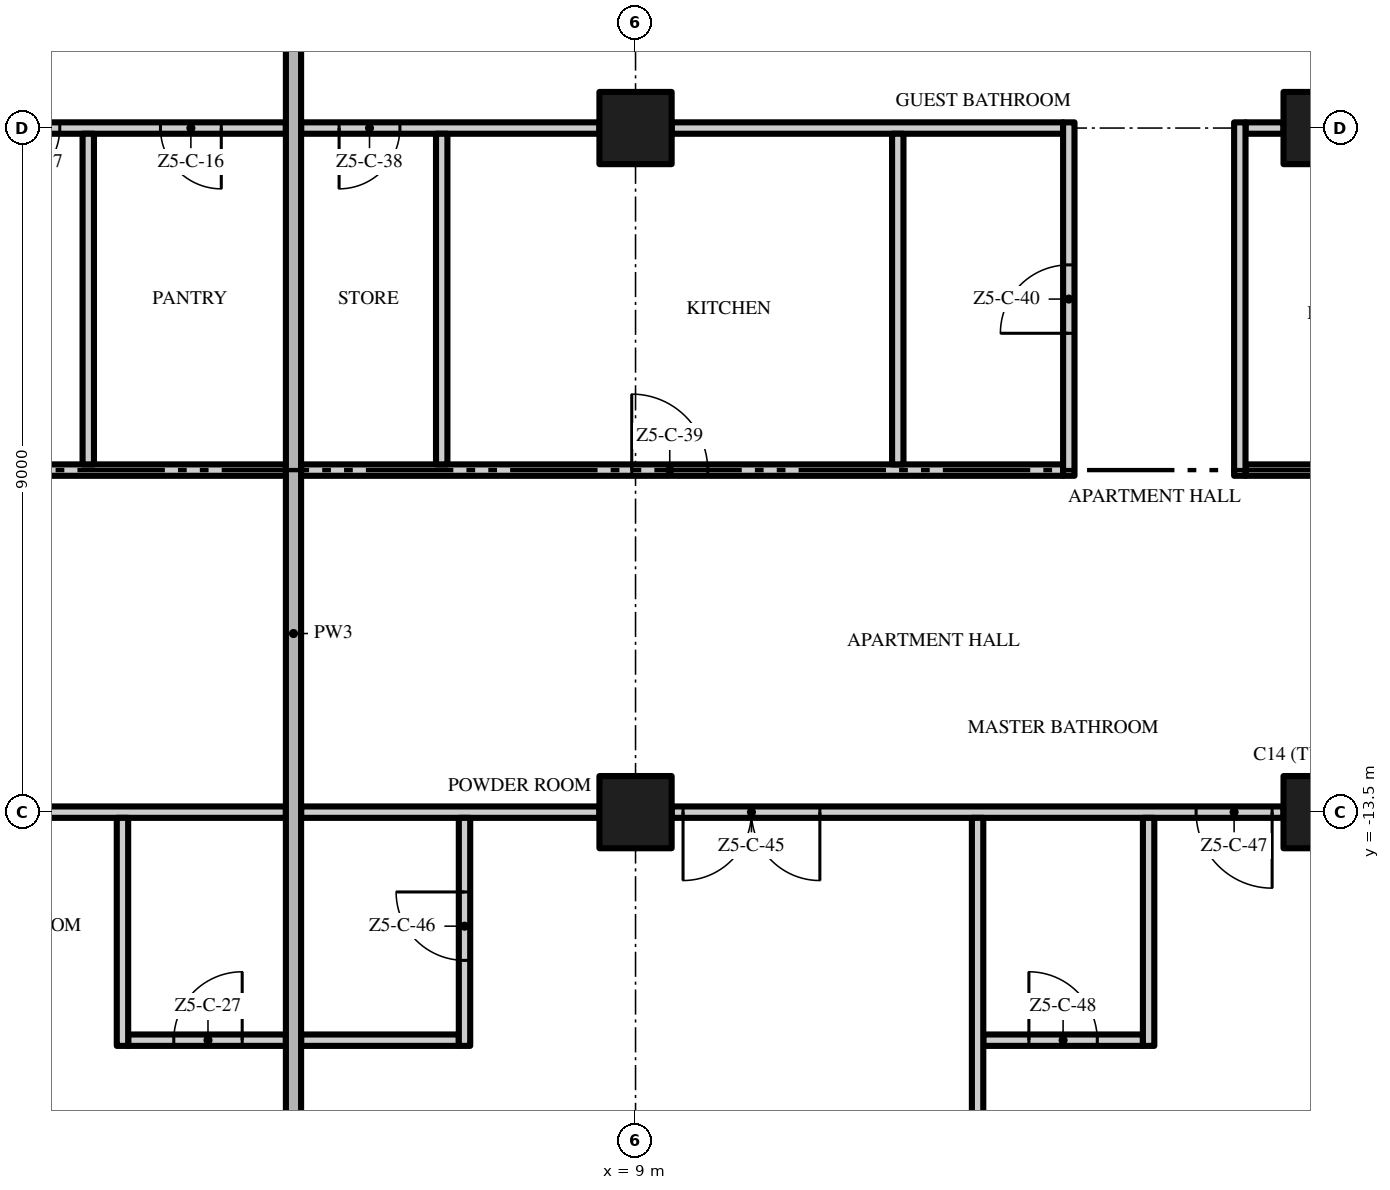
"""IFC4 building model, lengths in metres.
Left out: names, types, materials, properties, quantities, classifications, styles, units other than length and angle.
Written with IfcOpenShell. Run it as: python <this file> out.ifc"""

import sys

from ifc_helpers import new_model, si_unit, direction, frame, frame_2d, origin, origin_2d, place, context, subcontext, project, spatial, rectangle, extrude, element, fill, save


model = new_model("IFC4")
c1 = context("Model", 3, precision=1e-05, world=origin(), true_north=direction((0.0, 1.0)))
c2 = subcontext(c1, "Body", "Model", "MODEL_VIEW")
j1 = project(units=[si_unit("LENGTHUNIT", "METRE"), si_unit("PLANEANGLEUNIT", "RADIAN")], contexts=[c1])
p1 = place(None, origin())
s1 = spatial("IfcSite", under=j1, at=p1, CompositionType="ELEMENT")
p2 = place(p1, origin())
s2 = spatial("IfcBuilding", under=s1, at=p2, CompositionType="ELEMENT")
p3 = place(p2, frame((0.0, 0.0, 269.2)))
s3 = spatial("IfcBuildingStorey", under=s2, at=p3, CompositionType="ELEMENT", Elevation=269.2)
for number, where, z_axis, x_axis in (
    (1, (18.0, -13.5, 0.0), (0.0, 0.0, 1.0), (1.0, 0.0, 0.0)),
    (2, (18.0, -4.5, 0.0), (0.0, 0.0, 1.0), (1.0, 0.0, 0.0)),
    (3, (9.0, -13.5, 0.0), (0.0, 0.0, 1.0), (1.0, 0.0, 0.0)),
    (4, (9.0, -4.5, 0.0), (0.0, 0.0, 1.0), (1.0, 0.0, 0.0)),
):
    element("IfcColumn", number, at=place(p3, frame(where, z_axis=z_axis, x_axis=x_axis)), inside=s3, PredefinedType="COLUMN", context=c2, shape_type="SweptSolid", body=[
        extrude(rectangle(XDim=0.95, YDim=0.95, at=origin_2d()), origin(), (0.0, 0.0, 1.0), 3.5),
    ])
p4 = place(p3, frame((2.325, -16.5, 0.0), z_axis=(0.0, 0.0, 1.0), x_axis=(1.0, 0.0, 0.0)))
e5 = element("IfcWall", 5, at=p4, inside=s3, PredefinedType="PARTITIONING", context=c2, shape_type="SweptSolid", body=[
    extrude(rectangle(XDim=2.075, YDim=0.15, at=frame_2d((1.038, 0.0))), origin(), (0.0, 0.0, 1.0), 3.5),
])
p5 = place(p4, frame((0.6, 0.0, 0.0)))
e6 = element("IfcOpeningElement", 6, at=p5, cuts=e5, PredefinedType="OPENING", context=c2, shape_type="SweptSolid", body=[
    extrude(rectangle(XDim=0.9, YDim=2.1, at=frame_2d((0.45, 1.05))), frame((0.0, 0.085, 0.0), z_axis=(0.0, -1.0, 0.0), x_axis=(1.0, 0.0, 0.0)), (0.0, 0.0, 1.0), 0.17),
])
p6 = place(p3, frame((4.6, -16.5, 0.0), z_axis=(0.0, 0.0, 1.0), x_axis=(1.0, 0.0, 0.0)))
e7 = element("IfcWall", 7, at=p6, inside=s3, PredefinedType="PARTITIONING", context=c2, shape_type="SweptSolid", body=[
    extrude(rectangle(XDim=2.075, YDim=0.15, at=frame_2d((1.038, 0.0))), origin(), (0.0, 0.0, 1.0), 3.5),
])
p7 = place(p3, frame((13.575, -16.5, 0.0), z_axis=(0.0, 0.0, 1.0), x_axis=(1.0, 0.0, 0.0)))
e8 = element("IfcWall", 8, at=p7, inside=s3, PredefinedType="PARTITIONING", context=c2, shape_type="SweptSolid", body=[
    extrude(rectangle(XDim=2.1, YDim=0.15, at=frame_2d((1.05, 0.0))), origin(), (0.0, 0.0, 1.0), 3.5),
])
p8 = place(p7, frame((0.6, 0.0, 0.0)))
e9 = element("IfcOpeningElement", 9, at=p8, cuts=e8, PredefinedType="OPENING", context=c2, shape_type="SweptSolid", body=[
    extrude(rectangle(XDim=0.9, YDim=2.1, at=frame_2d((0.45, 1.05))), frame((0.0, 0.085, 0.0), z_axis=(0.0, -1.0, 0.0), x_axis=(1.0, 0.0, 0.0)), (0.0, 0.0, 1.0), 0.17),
])
for number, where, z_axis, x_axis in (
    (10, (0.475, -13.5, 0.0), (0.0, 0.0, 1.0), (1.0, 0.0, 0.0)),
    (11, (4.6, -13.5, 0.0), (0.0, 0.0, 1.0), (1.0, 0.0, 0.0)),
):
    element("IfcWall", number, at=place(p3, frame(where, z_axis=z_axis, x_axis=x_axis)), inside=s3, PredefinedType="PARTITIONING", context=c2, shape_type="SweptSolid", body=[
        extrude(rectangle(XDim=3.925, YDim=0.15, at=frame_2d((1.962, 0.0))), origin(), (0.0, 0.0, 1.0), 3.5),
    ])
p9 = place(p3, frame((17.525, -13.5, 0.0), z_axis=(0.0, 0.0, 1.0), x_axis=(-1.0, 0.0, 0.0)))
e12 = element("IfcWall", 12, at=p9, inside=s3, PredefinedType="PARTITIONING", context=c2, shape_type="SweptSolid", body=[
    extrude(rectangle(XDim=8.05, YDim=0.15, at=frame_2d((4.025, 0.0))), origin(), (0.0, 0.0, 1.0), 3.5),
])
p10 = place(p9, frame((6.1, 0.0, 0.0)))
e13 = element("IfcOpeningElement", 13, at=p10, cuts=e12, PredefinedType="OPENING", context=c2, shape_type="SweptSolid", body=[
    extrude(rectangle(XDim=1.8, YDim=2.4, at=frame_2d((0.9, 1.2))), frame((0.0, 0.085, 0.0), z_axis=(0.0, -1.0, 0.0), x_axis=(1.0, 0.0, 0.0)), (0.0, 0.0, 1.0), 0.17),
])
p11 = place(p9, frame((0.15, 0.0, 0.0)))
e14 = element("IfcOpeningElement", 14, at=p11, cuts=e12, PredefinedType="OPENING", context=c2, shape_type="SweptSolid", body=[
    extrude(rectangle(XDim=1.0, YDim=2.4, at=frame_2d((0.5, 1.2))), frame((0.0, 0.085, 0.0), z_axis=(0.0, -1.0, 0.0), x_axis=(1.0, 0.0, 0.0)), (0.0, 0.0, 1.0), 0.17),
])
p12 = place(p3, frame((-11.625, -9.0, 0.0), z_axis=(0.0, 0.0, 1.0), x_axis=(1.0, 0.0, 0.0)))
e15 = element("IfcWall", 15, at=p12, inside=s3, PredefinedType="PARTITIONING", context=c2, shape_type="SweptSolid", body=[
    extrude(rectangle(XDim=16.025, YDim=0.15, at=frame_2d((8.012, 0.0))), origin(), (0.0, 0.0, 1.0), 3.5),
])
p13 = place(p12, frame((4.675, 0.0, 0.0)))
e16 = element("IfcOpeningElement", 16, at=p13, cuts=e15, PredefinedType="OPENING", context=c2, shape_type="SweptSolid", body=[
    extrude(rectangle(XDim=1.0, YDim=2.4, at=frame_2d((0.5, 1.2))), frame((0.0, 0.085, 0.0), z_axis=(0.0, -1.0, 0.0), x_axis=(1.0, 0.0, 0.0)), (0.0, 0.0, 1.0), 0.17),
])
p14 = place(p3, frame((4.6, -9.0, 0.0), z_axis=(0.0, 0.0, 1.0), x_axis=(1.0, 0.0, 0.0)))
e17 = element("IfcWall", 17, at=p14, inside=s3, PredefinedType="PARTITIONING", context=c2, shape_type="SweptSolid", body=[
    extrude(rectangle(XDim=10.025, YDim=0.15, at=frame_2d((5.013, 0.0))), origin(), (0.0, 0.0, 1.0), 3.5),
])
p15 = place(p14, frame((4.35, 0.0, 0.0)))
e18 = element("IfcOpeningElement", 18, at=p15, cuts=e17, PredefinedType="OPENING", context=c2, shape_type="SweptSolid", body=[
    extrude(rectangle(XDim=1.0, YDim=2.4, at=frame_2d((0.5, 1.2))), frame((0.0, 0.085, 0.0), z_axis=(0.0, -1.0, 0.0), x_axis=(1.0, 0.0, 0.0)), (0.0, 0.0, 1.0), 0.17),
])
p16 = place(p3, frame((17.025, -9.0, 0.0), z_axis=(0.0, 0.0, 1.0), x_axis=(1.0, 0.0, 0.0)))
e19 = element("IfcWall", 19, at=p16, inside=s3, PredefinedType="PARTITIONING", context=c2, shape_type="SweptSolid", body=[
    extrude(rectangle(XDim=9.675, YDim=0.15, at=frame_2d((4.838, 0.0))), origin(), (0.0, 0.0, 1.0), 3.5),
])
p17 = place(p3, frame((4.4, -4.5, 0.0), z_axis=(0.0, 0.0, 1.0), x_axis=(-1.0, 0.0, 0.0)))
e20 = element("IfcWall", 20, at=p17, inside=s3, PredefinedType="PARTITIONING", context=c2, shape_type="SweptSolid", body=[
    extrude(rectangle(XDim=3.925, YDim=0.15, at=frame_2d((1.962, 0.0))), origin(), (0.0, 0.0, 1.0), 3.5),
])
p18 = place(p17, frame((0.85, 0.0, 0.0)))
e21 = element("IfcOpeningElement", 21, at=p18, cuts=e20, PredefinedType="OPENING", context=c2, shape_type="SweptSolid", body=[
    extrude(rectangle(XDim=0.8, YDim=2.0, at=frame_2d((0.4, 1.0))), frame((0.0, 0.085, 0.0), z_axis=(0.0, -1.0, 0.0), x_axis=(1.0, 0.0, 0.0)), (0.0, 0.0, 1.0), 0.17),
])
p19 = place(p17, frame((2.975, 0.0, 0.0)))
e22 = element("IfcOpeningElement", 22, at=p19, cuts=e20, PredefinedType="OPENING", context=c2, shape_type="SweptSolid", body=[
    extrude(rectangle(XDim=0.8, YDim=2.0, at=frame_2d((0.4, 1.0))), frame((0.0, 0.085, 0.0), z_axis=(0.0, -1.0, 0.0), x_axis=(1.0, 0.0, 0.0)), (0.0, 0.0, 1.0), 0.17),
])
p20 = place(p3, frame((8.525, -4.5, 0.0), z_axis=(0.0, 0.0, 1.0), x_axis=(-1.0, 0.0, 0.0)))
e23 = element("IfcWall", 23, at=p20, inside=s3, PredefinedType="PARTITIONING", context=c2, shape_type="SweptSolid", body=[
    extrude(rectangle(XDim=3.925, YDim=0.15, at=frame_2d((1.962, 0.0))), origin(), (0.0, 0.0, 1.0), 3.5),
])
p21 = place(p20, frame((2.625, 0.0, 0.0)))
e24 = element("IfcOpeningElement", 24, at=p21, cuts=e23, PredefinedType="OPENING", context=c2, shape_type="SweptSolid", body=[
    extrude(rectangle(XDim=0.8, YDim=2.0, at=frame_2d((0.4, 1.0))), frame((0.0, 0.085, 0.0), z_axis=(0.0, -1.0, 0.0), x_axis=(1.0, 0.0, 0.0)), (0.0, 0.0, 1.0), 0.17),
])
p22 = place(p3, frame((9.475, -4.5, 0.0), z_axis=(0.0, 0.0, 1.0), x_axis=(1.0, 0.0, 0.0)))
e25 = element("IfcWall", 25, at=p22, inside=s3, PredefinedType="PARTITIONING", context=c2, shape_type="SweptSolid", body=[
    extrude(rectangle(XDim=5.15, YDim=0.15, at=frame_2d((2.575, 0.0))), origin(), (0.0, 0.0, 1.0), 3.5),
])
p23 = place(p3, frame((17.025, -4.5, 0.0), z_axis=(0.0, 0.0, 1.0), x_axis=(1.0, 0.0, 0.0)))
e26 = element("IfcWall", 26, at=p23, inside=s3, PredefinedType="PARTITIONING", context=c2, shape_type="SweptSolid", body=[
    extrude(rectangle(XDim=0.5, YDim=0.15, at=frame_2d((0.25, 0.0))), origin(), (0.0, 0.0, 1.0), 3.5),
])
p24 = place(p3, frame((1.8, -8.925, 0.0), z_axis=(0.0, 0.0, 1.0), x_axis=(0.0, 1.0, 0.0)))
e27 = element("IfcWall", 27, at=p24, inside=s3, PredefinedType="PARTITIONING", context=c2, shape_type="SweptSolid", body=[
    extrude(rectangle(XDim=4.35, YDim=0.15, at=frame_2d((2.175, 0.0))), origin(), (0.0, 0.0, 1.0), 3.5),
])
p25 = place(p3, frame((2.25, -16.575, 0.0), z_axis=(0.0, 0.0, 1.0), x_axis=(0.0, 1.0, 0.0)))
e28 = element("IfcWall", 28, at=p25, inside=s3, PredefinedType="PARTITIONING", context=c2, shape_type="SweptSolid", body=[
    extrude(rectangle(XDim=3.0, YDim=0.15, at=frame_2d((1.5, 0.0))), origin(), (0.0, 0.0, 1.0), 3.5),
])
p26 = place(p3, frame((4.5, -22.2, 0.0), z_axis=(0.0, 0.0, 1.0), x_axis=(0.0, 1.0, 0.0)))
e29 = element("IfcWall", 29, at=p26, inside=s3, PredefinedType="PARTITIONING", context=c2, shape_type="SweptSolid", body=[
    extrude(rectangle(XDim=22.1, YDim=0.2, at=frame_2d((11.05, 0.0))), origin(), (0.0, 0.0, 1.0), 3.5),
])
p27 = place(p3, frame((6.45, -8.925, 0.0), z_axis=(0.0, 0.0, 1.0), x_axis=(0.0, 1.0, 0.0)))
e30 = element("IfcWall", 30, at=p27, inside=s3, PredefinedType="PARTITIONING", context=c2, shape_type="SweptSolid", body=[
    extrude(rectangle(XDim=4.35, YDim=0.15, at=frame_2d((2.175, 0.0))), origin(), (0.0, 0.0, 1.0), 3.5),
])
p28 = place(p3, frame((6.75, -16.575, 0.0), z_axis=(0.0, 0.0, 1.0), x_axis=(0.0, 1.0, 0.0)))
e31 = element("IfcWall", 31, at=p28, inside=s3, PredefinedType="PARTITIONING", context=c2, shape_type="SweptSolid", body=[
    extrude(rectangle(XDim=3.0, YDim=0.15, at=frame_2d((1.5, 0.0))), origin(), (0.0, 0.0, 1.0), 3.5),
])
p29 = place(p28, frame((1.125, 0.0, 0.0)))
e32 = element("IfcOpeningElement", 32, at=p29, cuts=e31, PredefinedType="OPENING", context=c2, shape_type="SweptSolid", body=[
    extrude(rectangle(XDim=0.9, YDim=2.1, at=frame_2d((0.45, 1.05))), frame((0.0, 0.085, 0.0), z_axis=(0.0, -1.0, 0.0), x_axis=(1.0, 0.0, 0.0)), (0.0, 0.0, 1.0), 0.17),
])
p30 = place(p3, frame((12.45, -8.925, 0.0), z_axis=(0.0, 0.0, 1.0), x_axis=(0.0, 1.0, 0.0)))
e33 = element("IfcWall", 33, at=p30, inside=s3, PredefinedType="PARTITIONING", context=c2, shape_type="SweptSolid", body=[
    extrude(rectangle(XDim=4.35, YDim=0.15, at=frame_2d((2.175, 0.0))), origin(), (0.0, 0.0, 1.0), 3.5),
])
p31 = place(p3, frame((13.5, -22.2, 0.0), z_axis=(0.0, 0.0, 1.0), x_axis=(0.0, 1.0, 0.0)))
e34 = element("IfcWall", 34, at=p31, inside=s3, PredefinedType="PARTITIONING", context=c2, shape_type="SweptSolid", body=[
    extrude(rectangle(XDim=8.625, YDim=0.15, at=frame_2d((4.312, 0.0))), origin(), (0.0, 0.0, 1.0), 3.5),
])
p32 = place(p3, frame((14.7, -9.075, 0.0), z_axis=(0.0, 0.0, 1.0), x_axis=(0.0, 1.0, 0.0)))
e35 = element("IfcWall", 35, at=p32, inside=s3, PredefinedType="PARTITIONING", context=c2, shape_type="SweptSolid", body=[
    extrude(rectangle(XDim=4.65, YDim=0.15, at=frame_2d((2.325, 0.0))), origin(), (0.0, 0.0, 1.0), 3.5),
])
p33 = place(p32, frame((1.875, 0.0, 0.0)))
e36 = element("IfcOpeningElement", 36, at=p33, cuts=e35, PredefinedType="OPENING", context=c2, shape_type="SweptSolid", body=[
    extrude(rectangle(XDim=0.9, YDim=2.1, at=frame_2d((0.45, 1.05))), frame((0.0, 0.085, 0.0), z_axis=(0.0, -1.0, 0.0), x_axis=(1.0, 0.0, 0.0)), (0.0, 0.0, 1.0), 0.17),
])
p34 = place(p3, frame((15.75, -16.575, 0.0), z_axis=(0.0, 0.0, 1.0), x_axis=(0.0, 1.0, 0.0)))
e37 = element("IfcWall", 37, at=p34, inside=s3, PredefinedType="PARTITIONING", context=c2, shape_type="SweptSolid", body=[
    extrude(rectangle(XDim=3.0, YDim=0.15, at=frame_2d((1.5, 0.0))), origin(), (0.0, 0.0, 1.0), 3.5),
])
p35 = place(p3, frame((16.95, -9.075, 0.0), z_axis=(0.0, 0.0, 1.0), x_axis=(0.0, 1.0, 0.0)))
e38 = element("IfcWall", 38, at=p35, inside=s3, PredefinedType="PARTITIONING", context=c2, shape_type="SweptSolid", body=[
    extrude(rectangle(XDim=4.65, YDim=0.15, at=frame_2d((2.325, 0.0))), origin(), (0.0, 0.0, 1.0), 3.5),
])
p36 = place(p18, origin())
e39 = element("IfcDoor", 39, at=p36, inside=s3, OperationType="SINGLE_SWING_LEFT", PredefinedType="DOOR", context=c2, shape_type="SweptSolid", body=[
    extrude(rectangle(XDim=0.8, YDim=2.0, at=frame_2d((0.4, 1.0))), frame((0.0, 0.025, 0.0), z_axis=(0.0, -1.0, 0.0), x_axis=(1.0, 0.0, 0.0)), (0.0, 0.0, 1.0), 0.05),
])
fill(e21, e39)
p37 = place(p19, origin())
e40 = element("IfcDoor", 40, at=p37, inside=s3, OperationType="SINGLE_SWING_RIGHT", PredefinedType="DOOR", context=c2, shape_type="SweptSolid", body=[
    extrude(rectangle(XDim=0.8, YDim=2.0, at=frame_2d((0.4, 1.0))), frame((0.0, 0.025, 0.0), z_axis=(0.0, -1.0, 0.0), x_axis=(1.0, 0.0, 0.0)), (0.0, 0.0, 1.0), 0.05),
])
fill(e22, e40)
p38 = place(p5, origin())
e41 = element("IfcDoor", 41, at=p38, inside=s3, OperationType="SINGLE_SWING_RIGHT", PredefinedType="DOOR", context=c2, shape_type="SweptSolid", body=[
    extrude(rectangle(XDim=0.9, YDim=2.1, at=frame_2d((0.45, 1.05))), frame((0.0, 0.025, 0.0), z_axis=(0.0, -1.0, 0.0), x_axis=(1.0, 0.0, 0.0)), (0.0, 0.0, 1.0), 0.05),
])
fill(e6, e41)
p39 = place(p21, origin())
e42 = element("IfcDoor", 42, at=p39, inside=s3, OperationType="SINGLE_SWING_RIGHT", PredefinedType="DOOR", context=c2, shape_type="SweptSolid", body=[
    extrude(rectangle(XDim=0.8, YDim=2.0, at=frame_2d((0.4, 1.0))), frame((0.0, 0.025, 0.0), z_axis=(0.0, -1.0, 0.0), x_axis=(1.0, 0.0, 0.0)), (0.0, 0.0, 1.0), 0.05),
])
fill(e24, e42)
p40 = place(p15, origin())
e43 = element("IfcDoor", 43, at=p40, inside=s3, OperationType="SINGLE_SWING_LEFT", PredefinedType="DOOR", context=c2, shape_type="SweptSolid", body=[
    extrude(rectangle(XDim=1.0, YDim=2.4, at=frame_2d((0.5, 1.2))), frame((0.0, 0.025, 0.0), z_axis=(0.0, -1.0, 0.0), x_axis=(1.0, 0.0, 0.0)), (0.0, 0.0, 1.0), 0.05),
])
fill(e18, e43)
p41 = place(p33, origin())
e44 = element("IfcDoor", 44, at=p41, inside=s3, OperationType="SINGLE_SWING_LEFT", PredefinedType="DOOR", context=c2, shape_type="SweptSolid", body=[
    extrude(rectangle(XDim=0.9, YDim=2.1, at=frame_2d((0.45, 1.05))), frame((0.0, 0.025, 0.0), z_axis=(0.0, -1.0, 0.0), x_axis=(1.0, 0.0, 0.0)), (0.0, 0.0, 1.0), 0.05),
])
fill(e36, e44)
p42 = place(p10, origin())
e45 = element("IfcDoor", 45, at=p42, inside=s3, OperationType="DOUBLE_DOOR_SINGLE_SWING", PredefinedType="DOOR", context=c2, shape_type="SweptSolid", body=[
    extrude(rectangle(XDim=1.8, YDim=2.4, at=frame_2d((0.9, 1.2))), frame((0.0, 0.025, 0.0), z_axis=(0.0, -1.0, 0.0), x_axis=(1.0, 0.0, 0.0)), (0.0, 0.0, 1.0), 0.05),
])
fill(e13, e45)
p43 = place(p29, origin())
e46 = element("IfcDoor", 46, at=p43, inside=s3, OperationType="SINGLE_SWING_RIGHT", PredefinedType="DOOR", context=c2, shape_type="SweptSolid", body=[
    extrude(rectangle(XDim=0.9, YDim=2.1, at=frame_2d((0.45, 1.05))), frame((0.0, 0.025, 0.0), z_axis=(0.0, -1.0, 0.0), x_axis=(1.0, 0.0, 0.0)), (0.0, 0.0, 1.0), 0.05),
])
fill(e32, e46)
p44 = place(p11, origin())
e47 = element("IfcDoor", 47, at=p44, inside=s3, OperationType="SINGLE_SWING_LEFT", PredefinedType="DOOR", context=c2, shape_type="SweptSolid", body=[
    extrude(rectangle(XDim=1.0, YDim=2.4, at=frame_2d((0.5, 1.2))), frame((0.0, 0.025, 0.0), z_axis=(0.0, -1.0, 0.0), x_axis=(1.0, 0.0, 0.0)), (0.0, 0.0, 1.0), 0.05),
])
fill(e14, e47)
p45 = place(p8, origin())
e48 = element("IfcDoor", 48, at=p45, inside=s3, OperationType="SINGLE_SWING_LEFT", PredefinedType="DOOR", context=c2, shape_type="SweptSolid", body=[
    extrude(rectangle(XDim=0.9, YDim=2.1, at=frame_2d((0.45, 1.05))), frame((0.0, 0.025, 0.0), z_axis=(0.0, -1.0, 0.0), x_axis=(1.0, 0.0, 0.0)), (0.0, 0.0, 1.0), 0.05),
])
fill(e9, e48)
save(model, sys.argv[1])
